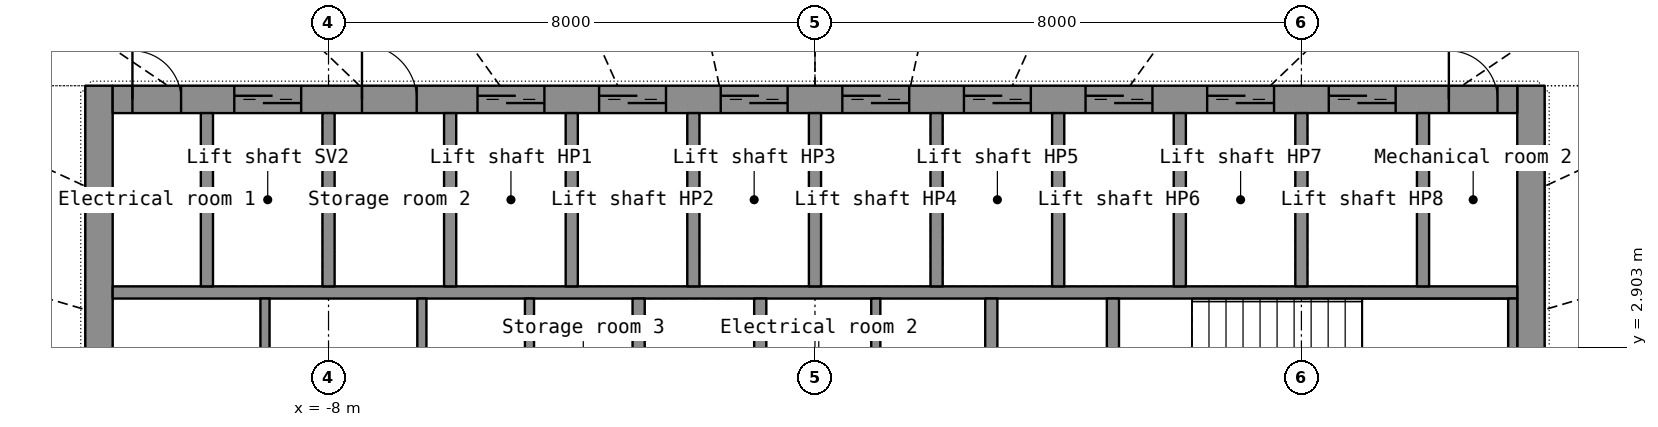
"""IFC4 building model, lengths in metres.
Left out: names, types, materials, properties, quantities, classifications, styles, units other than length and angle.
Written with IfcOpenShell. Run it as: python <this file> out.ifc"""

import sys

from ifc_helpers import new_model, si_unit, direction, frame, frame_2d, origin, place, context, subcontext, project, spatial, rectangle, extrude, element, fill, save


model = new_model("IFC4")
c1 = context("Model", 3, precision=1e-05, world=origin(), true_north=direction((0.0, 1.0)))
c2 = subcontext(c1, "Body", "Model", "MODEL_VIEW")
j1 = project(units=[si_unit("LENGTHUNIT", "METRE"), si_unit("PLANEANGLEUNIT", "RADIAN")], contexts=[c1])
p1 = place(None, origin())
s1 = spatial("IfcSite", under=j1, at=p1, CompositionType="ELEMENT")
p2 = place(p1, origin())
s2 = spatial("IfcBuilding", under=s1, at=p2, CompositionType="ELEMENT")
p3 = place(p2, frame((0.0, 0.0, 171.9)))
s3 = spatial("IfcBuildingStorey", under=s2, at=p3, CompositionType="ELEMENT", Elevation=171.9)
p4 = place(p3, frame((-11.775, -7.2, 0.0), z_axis=(0.0, 0.0, 1.0), x_axis=(0.0, 1.0, 0.0)))
e1 = element("IfcWall", 1, at=p4, inside=s3, PredefinedType="SHEAR", context=c2, shape_type="SweptSolid", body=[
    extrude(rectangle(XDim=14.4, YDim=0.45, at=frame_2d((7.2, 0.0))), origin(), (0.0, 0.0, 1.0), 3.3),
])
p5 = place(p4, frame((6.5, 0.0, 0.0)))
e2 = element("IfcOpeningElement", 2, at=p5, cuts=e1, PredefinedType="OPENING", context=c2, shape_type="SweptSolid", body=[
    extrude(rectangle(XDim=1.4, YDim=2.2, at=frame_2d((0.7, 1.1))), frame((0.0, 0.235, 0.0), z_axis=(0.0, -1.0, 0.0), x_axis=(1.0, 0.0, 0.0)), (0.0, 0.0, 1.0), 0.47),
])
p6 = place(p3, frame((11.775, -7.2, 0.0), z_axis=(0.0, 0.0, 1.0), x_axis=(0.0, 1.0, 0.0)))
e3 = element("IfcWall", 3, at=p6, inside=s3, PredefinedType="SHEAR", context=c2, shape_type="SweptSolid", body=[
    extrude(rectangle(XDim=14.4, YDim=0.45, at=frame_2d((7.2, 0.0))), origin(), (0.0, 0.0, 1.0), 3.3),
])
p7 = place(p6, frame((6.5, 0.0, 0.0)))
e4 = element("IfcOpeningElement", 4, at=p7, cuts=e3, PredefinedType="OPENING", context=c2, shape_type="SweptSolid", body=[
    extrude(rectangle(XDim=1.4, YDim=2.2, at=frame_2d((0.7, 1.1))), frame((0.0, 0.235, 0.0), z_axis=(0.0, -1.0, 0.0), x_axis=(1.0, 0.0, 0.0)), (0.0, 0.0, 1.0), 0.47),
])
p8 = place(p3, frame((-11.55, 6.975, 0.0), z_axis=(0.0, 0.0, 1.0), x_axis=(1.0, 0.0, 0.0)))
e5 = element("IfcWall", 5, at=p8, inside=s3, PredefinedType="SHEAR", context=c2, shape_type="SweptSolid", body=[
    extrude(rectangle(XDim=23.1, YDim=0.45, at=frame_2d((11.55, 0.0))), origin(), (0.0, 0.0, 1.0), 3.3),
])
p9 = place(p8, frame((2.0, 0.0, 0.0)))
e6 = element("IfcOpeningElement", 6, at=p9, cuts=e5, PredefinedType="OPENING", context=c2, shape_type="SweptSolid", body=[
    extrude(rectangle(XDim=1.1, YDim=2.2, at=frame_2d((0.55, 1.1))), frame((0.0, 0.235, 0.0), z_axis=(0.0, -1.0, 0.0), x_axis=(1.0, 0.0, 0.0)), (0.0, 0.0, 1.0), 0.47),
])
p10 = place(p8, frame((6.0, 0.0, 0.0)))
e7 = element("IfcOpeningElement", 7, at=p10, cuts=e5, PredefinedType="OPENING", context=c2, shape_type="SweptSolid", body=[
    extrude(rectangle(XDim=1.1, YDim=2.2, at=frame_2d((0.55, 1.1))), frame((0.0, 0.235, 0.0), z_axis=(0.0, -1.0, 0.0), x_axis=(1.0, 0.0, 0.0)), (0.0, 0.0, 1.0), 0.47),
])
p11 = place(p8, frame((8.0, 0.0, 0.0)))
e8 = element("IfcOpeningElement", 8, at=p11, cuts=e5, PredefinedType="OPENING", context=c2, shape_type="SweptSolid", body=[
    extrude(rectangle(XDim=1.1, YDim=2.2, at=frame_2d((0.55, 1.1))), frame((0.0, 0.235, 0.0), z_axis=(0.0, -1.0, 0.0), x_axis=(1.0, 0.0, 0.0)), (0.0, 0.0, 1.0), 0.47),
])
p12 = place(p8, frame((10.0, 0.0, 0.0)))
e9 = element("IfcOpeningElement", 9, at=p12, cuts=e5, PredefinedType="OPENING", context=c2, shape_type="SweptSolid", body=[
    extrude(rectangle(XDim=1.1, YDim=2.2, at=frame_2d((0.55, 1.1))), frame((0.0, 0.235, 0.0), z_axis=(0.0, -1.0, 0.0), x_axis=(1.0, 0.0, 0.0)), (0.0, 0.0, 1.0), 0.47),
])
p13 = place(p8, frame((12.0, 0.0, 0.0)))
e10 = element("IfcOpeningElement", 10, at=p13, cuts=e5, PredefinedType="OPENING", context=c2, shape_type="SweptSolid", body=[
    extrude(rectangle(XDim=1.1, YDim=2.2, at=frame_2d((0.55, 1.1))), frame((0.0, 0.235, 0.0), z_axis=(0.0, -1.0, 0.0), x_axis=(1.0, 0.0, 0.0)), (0.0, 0.0, 1.0), 0.47),
])
p14 = place(p8, frame((14.0, 0.0, 0.0)))
e11 = element("IfcOpeningElement", 11, at=p14, cuts=e5, PredefinedType="OPENING", context=c2, shape_type="SweptSolid", body=[
    extrude(rectangle(XDim=1.1, YDim=2.2, at=frame_2d((0.55, 1.1))), frame((0.0, 0.235, 0.0), z_axis=(0.0, -1.0, 0.0), x_axis=(1.0, 0.0, 0.0)), (0.0, 0.0, 1.0), 0.47),
])
p15 = place(p8, frame((16.0, 0.0, 0.0)))
e12 = element("IfcOpeningElement", 12, at=p15, cuts=e5, PredefinedType="OPENING", context=c2, shape_type="SweptSolid", body=[
    extrude(rectangle(XDim=1.1, YDim=2.2, at=frame_2d((0.55, 1.1))), frame((0.0, 0.235, 0.0), z_axis=(0.0, -1.0, 0.0), x_axis=(1.0, 0.0, 0.0)), (0.0, 0.0, 1.0), 0.47),
])
p16 = place(p8, frame((18.0, 0.0, 0.0)))
e13 = element("IfcOpeningElement", 13, at=p16, cuts=e5, PredefinedType="OPENING", context=c2, shape_type="SweptSolid", body=[
    extrude(rectangle(XDim=1.1, YDim=2.2, at=frame_2d((0.55, 1.1))), frame((0.0, 0.235, 0.0), z_axis=(0.0, -1.0, 0.0), x_axis=(1.0, 0.0, 0.0)), (0.0, 0.0, 1.0), 0.47),
])
p17 = place(p8, frame((20.0, 0.0, 0.0)))
e14 = element("IfcOpeningElement", 14, at=p17, cuts=e5, PredefinedType="OPENING", context=c2, shape_type="SweptSolid", body=[
    extrude(rectangle(XDim=1.1, YDim=2.2, at=frame_2d((0.55, 1.1))), frame((0.0, 0.235, 0.0), z_axis=(0.0, -1.0, 0.0), x_axis=(1.0, 0.0, 0.0)), (0.0, 0.0, 1.0), 0.47),
])
p18 = place(p8, frame((4.1, 0.0, 0.0)))
e15 = element("IfcOpeningElement", 15, at=p18, cuts=e5, PredefinedType="OPENING", context=c2, shape_type="SweptSolid", body=[
    extrude(rectangle(XDim=0.9, YDim=2.1, at=frame_2d((0.45, 1.05))), frame((0.0, 0.235, 0.0), z_axis=(0.0, -1.0, 0.0), x_axis=(1.0, 0.0, 0.0)), (0.0, 0.0, 1.0), 0.47),
])
p19 = place(p8, frame((0.325, 0.0, 0.0)))
e16 = element("IfcOpeningElement", 16, at=p19, cuts=e5, PredefinedType="OPENING", context=c2, shape_type="SweptSolid", body=[
    extrude(rectangle(XDim=0.8, YDim=2.05, at=frame_2d((0.4, 1.025))), frame((0.0, 0.235, 0.0), z_axis=(0.0, -1.0, 0.0), x_axis=(1.0, 0.0, 0.0)), (0.0, 0.0, 1.0), 0.47),
])
p20 = place(p8, frame((21.975, 0.0, 0.0)))
e17 = element("IfcOpeningElement", 17, at=p20, cuts=e5, PredefinedType="OPENING", context=c2, shape_type="SweptSolid", body=[
    extrude(rectangle(XDim=0.8, YDim=2.05, at=frame_2d((0.4, 1.025))), frame((0.0, 0.235, 0.0), z_axis=(0.0, -1.0, 0.0), x_axis=(1.0, 0.0, 0.0)), (0.0, 0.0, 1.0), 0.47),
])
p21 = place(p3, frame((-11.55, 3.8, 0.0), z_axis=(0.0, 0.0, 1.0), x_axis=(1.0, 0.0, 0.0)))
e18 = element("IfcWall", 18, at=p21, inside=s3, PredefinedType="SHEAR", context=c2, shape_type="SweptSolid", body=[
    extrude(rectangle(XDim=23.1, YDim=0.2, at=frame_2d((11.55, 0.0))), origin(), (0.0, 0.0, 1.0), 3.3),
])
for number, where, z_axis, x_axis in (
    (19, (-10.0, 3.9, 0.0), (0.0, 0.0, 1.0), (0.0, 1.0, 0.0)),
    (20, (-8.0, 3.9, 0.0), (0.0, 0.0, 1.0), (0.0, 1.0, 0.0)),
    (21, (-6.0, 3.9, 0.0), (0.0, 0.0, 1.0), (0.0, 1.0, 0.0)),
    (22, (-4.0, 3.9, 0.0), (0.0, 0.0, 1.0), (0.0, 1.0, 0.0)),
    (23, (-2.0, 3.9, 0.0), (0.0, 0.0, 1.0), (0.0, 1.0, 0.0)),
    (24, (0.0, 3.9, 0.0), (0.0, 0.0, 1.0), (0.0, 1.0, 0.0)),
    (25, (2.0, 3.9, 0.0), (0.0, 0.0, 1.0), (0.0, 1.0, 0.0)),
    (26, (4.0, 3.9, 0.0), (0.0, 0.0, 1.0), (0.0, 1.0, 0.0)),
    (27, (6.0, 3.9, 0.0), (0.0, 0.0, 1.0), (0.0, 1.0, 0.0)),
    (28, (8.0, 3.9, 0.0), (0.0, 0.0, 1.0), (0.0, 1.0, 0.0)),
    (29, (10.0, 3.9, 0.0), (0.0, 0.0, 1.0), (0.0, 1.0, 0.0)),
):
    element("IfcWall", number, at=place(p3, frame(where, z_axis=z_axis, x_axis=x_axis)), inside=s3, PredefinedType="SHEAR", context=c2, shape_type="SweptSolid", body=[
        extrude(rectangle(XDim=2.85, YDim=0.2, at=frame_2d((1.425, 0.0))), origin(), (0.0, 0.0, 1.0), 3.3),
    ])
p22 = place(p3, frame((-2.9, -3.7, 0.0), z_axis=(0.0, 0.0, 1.0), x_axis=(0.0, 1.0, 0.0)))
e30 = element("IfcWall", 30, at=p22, inside=s3, PredefinedType="SHEAR", context=c2, shape_type="SweptSolid", body=[
    extrude(rectangle(XDim=7.4, YDim=0.2, at=frame_2d((3.7, 0.0))), origin(), (0.0, 0.0, 1.0), 3.3),
])
p23 = place(p22, frame((3.1, 0.0, 0.0)))
e31 = element("IfcOpeningElement", 31, at=p23, cuts=e30, PredefinedType="OPENING", context=c2, shape_type="SweptSolid", body=[
    extrude(rectangle(XDim=1.2, YDim=2.2, at=frame_2d((0.6, 1.1))), frame((0.0, 0.11, 0.0), z_axis=(0.0, -1.0, 0.0), x_axis=(1.0, 0.0, 0.0)), (0.0, 0.0, 1.0), 0.22),
])
p24 = place(p3, frame((2.9, -3.7, 0.0), z_axis=(0.0, 0.0, 1.0), x_axis=(0.0, 1.0, 0.0)))
e32 = element("IfcWall", 32, at=p24, inside=s3, PredefinedType="SHEAR", context=c2, shape_type="SweptSolid", body=[
    extrude(rectangle(XDim=7.4, YDim=0.2, at=frame_2d((3.7, 0.0))), origin(), (0.0, 0.0, 1.0), 3.3),
])
p25 = place(p24, frame((3.1, 0.0, 0.0)))
e33 = element("IfcOpeningElement", 33, at=p25, cuts=e32, PredefinedType="OPENING", context=c2, shape_type="SweptSolid", body=[
    extrude(rectangle(XDim=1.2, YDim=2.2, at=frame_2d((0.6, 1.1))), frame((0.0, 0.11, 0.0), z_axis=(0.0, -1.0, 0.0), x_axis=(1.0, 0.0, 0.0)), (0.0, 0.0, 1.0), 0.22),
])
p26 = place(p3, frame((-0.9, 1.35, 0.0), z_axis=(0.0, 0.0, 1.0), x_axis=(0.0, 1.0, 0.0)))
e34 = element("IfcWall", 34, at=p26, inside=s3, PredefinedType="SHEAR", context=c2, shape_type="SweptSolid", body=[
    extrude(rectangle(XDim=2.35, YDim=0.2, at=frame_2d((1.175, 0.0))), origin(), (0.0, 0.0, 1.0), 3.3),
])
p27 = place(p3, frame((11.475, 1.35, 0.0), z_axis=(0.0, 0.0, 1.0), x_axis=(0.0, 1.0, 0.0)))
e35 = element("IfcWall", 35, at=p27, inside=s3, PredefinedType="SHEAR", context=c2, shape_type="SweptSolid", body=[
    extrude(rectangle(XDim=2.35, YDim=0.15, at=frame_2d((1.175, 0.0))), origin(), (0.0, 0.0, 1.0), 3.3),
])
p28 = place(p3, frame((4.9, 1.35, 0.0), z_axis=(0.0, 0.0, 1.0), x_axis=(0.0, 1.0, 0.0)))
e36 = element("IfcWall", 36, at=p28, inside=s3, PredefinedType="SHEAR", context=c2, shape_type="SweptSolid", body=[
    extrude(rectangle(XDim=2.35, YDim=0.2, at=frame_2d((1.175, 0.0))), origin(), (0.0, 0.0, 1.0), 3.3),
])
for number, where, z_axis, x_axis in (
    (37, (-9.045, 1.35, 0.0), (0.0, 0.0, 1.0), (0.0, 1.0, 0.0)),
    (38, (-6.465, 1.35, 0.0), (0.0, 0.0, 1.0), (0.0, 1.0, 0.0)),
    (39, (-4.695, 1.35, 0.0), (0.0, 0.0, 1.0), (0.0, 1.0, 0.0)),
    (40, (1.0, 1.35, 0.0), (0.0, 0.0, 1.0), (0.0, 1.0, 0.0)),
):
    element("IfcWall", number, at=place(p3, frame(where, z_axis=z_axis, x_axis=x_axis)), inside=s3, PredefinedType="PARTITIONING", context=c2, shape_type="SweptSolid", body=[
        extrude(rectangle(XDim=2.35, YDim=0.15, at=frame_2d((1.175, 0.0))), origin(), (0.0, 0.0, 1.0), 3.3),
    ])
p29 = place(p9, origin())
e41 = element("IfcDoor", 41, at=p29, inside=s3, OperationType="DOUBLE_DOOR_SLIDING", PredefinedType="DOOR", context=c2, shape_type="SweptSolid", body=[
    extrude(rectangle(XDim=1.1, YDim=2.2, at=frame_2d((0.55, 1.1))), frame((0.0, 0.025, 0.0), z_axis=(0.0, -1.0, 0.0), x_axis=(1.0, 0.0, 0.0)), (0.0, 0.0, 1.0), 0.05),
])
fill(e6, e41)
p30 = place(p10, origin())
e42 = element("IfcDoor", 42, at=p30, inside=s3, OperationType="DOUBLE_DOOR_SLIDING", PredefinedType="DOOR", context=c2, shape_type="SweptSolid", body=[
    extrude(rectangle(XDim=1.1, YDim=2.2, at=frame_2d((0.55, 1.1))), frame((0.0, 0.025, 0.0), z_axis=(0.0, -1.0, 0.0), x_axis=(1.0, 0.0, 0.0)), (0.0, 0.0, 1.0), 0.05),
])
fill(e7, e42)
p31 = place(p11, origin())
e43 = element("IfcDoor", 43, at=p31, inside=s3, OperationType="DOUBLE_DOOR_SLIDING", PredefinedType="DOOR", context=c2, shape_type="SweptSolid", body=[
    extrude(rectangle(XDim=1.1, YDim=2.2, at=frame_2d((0.55, 1.1))), frame((0.0, 0.025, 0.0), z_axis=(0.0, -1.0, 0.0), x_axis=(1.0, 0.0, 0.0)), (0.0, 0.0, 1.0), 0.05),
])
fill(e8, e43)
p32 = place(p12, origin())
e44 = element("IfcDoor", 44, at=p32, inside=s3, OperationType="DOUBLE_DOOR_SLIDING", PredefinedType="DOOR", context=c2, shape_type="SweptSolid", body=[
    extrude(rectangle(XDim=1.1, YDim=2.2, at=frame_2d((0.55, 1.1))), frame((0.0, 0.025, 0.0), z_axis=(0.0, -1.0, 0.0), x_axis=(1.0, 0.0, 0.0)), (0.0, 0.0, 1.0), 0.05),
])
fill(e9, e44)
p33 = place(p13, origin())
e45 = element("IfcDoor", 45, at=p33, inside=s3, OperationType="DOUBLE_DOOR_SLIDING", PredefinedType="DOOR", context=c2, shape_type="SweptSolid", body=[
    extrude(rectangle(XDim=1.1, YDim=2.2, at=frame_2d((0.55, 1.1))), frame((0.0, 0.025, 0.0), z_axis=(0.0, -1.0, 0.0), x_axis=(1.0, 0.0, 0.0)), (0.0, 0.0, 1.0), 0.05),
])
fill(e10, e45)
p34 = place(p14, origin())
e46 = element("IfcDoor", 46, at=p34, inside=s3, OperationType="DOUBLE_DOOR_SLIDING", PredefinedType="DOOR", context=c2, shape_type="SweptSolid", body=[
    extrude(rectangle(XDim=1.1, YDim=2.2, at=frame_2d((0.55, 1.1))), frame((0.0, 0.025, 0.0), z_axis=(0.0, -1.0, 0.0), x_axis=(1.0, 0.0, 0.0)), (0.0, 0.0, 1.0), 0.05),
])
fill(e11, e46)
p35 = place(p15, origin())
e47 = element("IfcDoor", 47, at=p35, inside=s3, OperationType="DOUBLE_DOOR_SLIDING", PredefinedType="DOOR", context=c2, shape_type="SweptSolid", body=[
    extrude(rectangle(XDim=1.1, YDim=2.2, at=frame_2d((0.55, 1.1))), frame((0.0, 0.025, 0.0), z_axis=(0.0, -1.0, 0.0), x_axis=(1.0, 0.0, 0.0)), (0.0, 0.0, 1.0), 0.05),
])
fill(e12, e47)
p36 = place(p16, origin())
e48 = element("IfcDoor", 48, at=p36, inside=s3, OperationType="DOUBLE_DOOR_SLIDING", PredefinedType="DOOR", context=c2, shape_type="SweptSolid", body=[
    extrude(rectangle(XDim=1.1, YDim=2.2, at=frame_2d((0.55, 1.1))), frame((0.0, 0.025, 0.0), z_axis=(0.0, -1.0, 0.0), x_axis=(1.0, 0.0, 0.0)), (0.0, 0.0, 1.0), 0.05),
])
fill(e13, e48)
p37 = place(p17, origin())
e49 = element("IfcDoor", 49, at=p37, inside=s3, OperationType="DOUBLE_DOOR_SLIDING", PredefinedType="DOOR", context=c2, shape_type="SweptSolid", body=[
    extrude(rectangle(XDim=1.1, YDim=2.2, at=frame_2d((0.55, 1.1))), frame((0.0, 0.025, 0.0), z_axis=(0.0, -1.0, 0.0), x_axis=(1.0, 0.0, 0.0)), (0.0, 0.0, 1.0), 0.05),
])
fill(e14, e49)
p38 = place(p18, origin())
e50 = element("IfcDoor", 50, at=p38, inside=s3, OperationType="SINGLE_SWING_LEFT", PredefinedType="DOOR", context=c2, shape_type="SweptSolid", body=[
    extrude(rectangle(XDim=0.9, YDim=2.1, at=frame_2d((0.45, 1.05))), frame((0.0, 0.025, 0.0), z_axis=(0.0, -1.0, 0.0), x_axis=(1.0, 0.0, 0.0)), (0.0, 0.0, 1.0), 0.05),
])
fill(e15, e50)
p39 = place(p19, origin())
e51 = element("IfcDoor", 51, at=p39, inside=s3, OperationType="SINGLE_SWING_LEFT", PredefinedType="DOOR", context=c2, shape_type="SweptSolid", body=[
    extrude(rectangle(XDim=0.8, YDim=2.05, at=frame_2d((0.4, 1.025))), frame((0.0, 0.025, 0.0), z_axis=(0.0, -1.0, 0.0), x_axis=(1.0, 0.0, 0.0)), (0.0, 0.0, 1.0), 0.05),
])
fill(e16, e51)
p40 = place(p20, origin())
e52 = element("IfcDoor", 52, at=p40, inside=s3, OperationType="SINGLE_SWING_LEFT", PredefinedType="DOOR", context=c2, shape_type="SweptSolid", body=[
    extrude(rectangle(XDim=0.8, YDim=2.05, at=frame_2d((0.4, 1.025))), frame((0.0, 0.025, 0.0), z_axis=(0.0, -1.0, 0.0), x_axis=(1.0, 0.0, 0.0)), (0.0, 0.0, 1.0), 0.05),
])
fill(e17, e52)
save(model, sys.argv[1])
